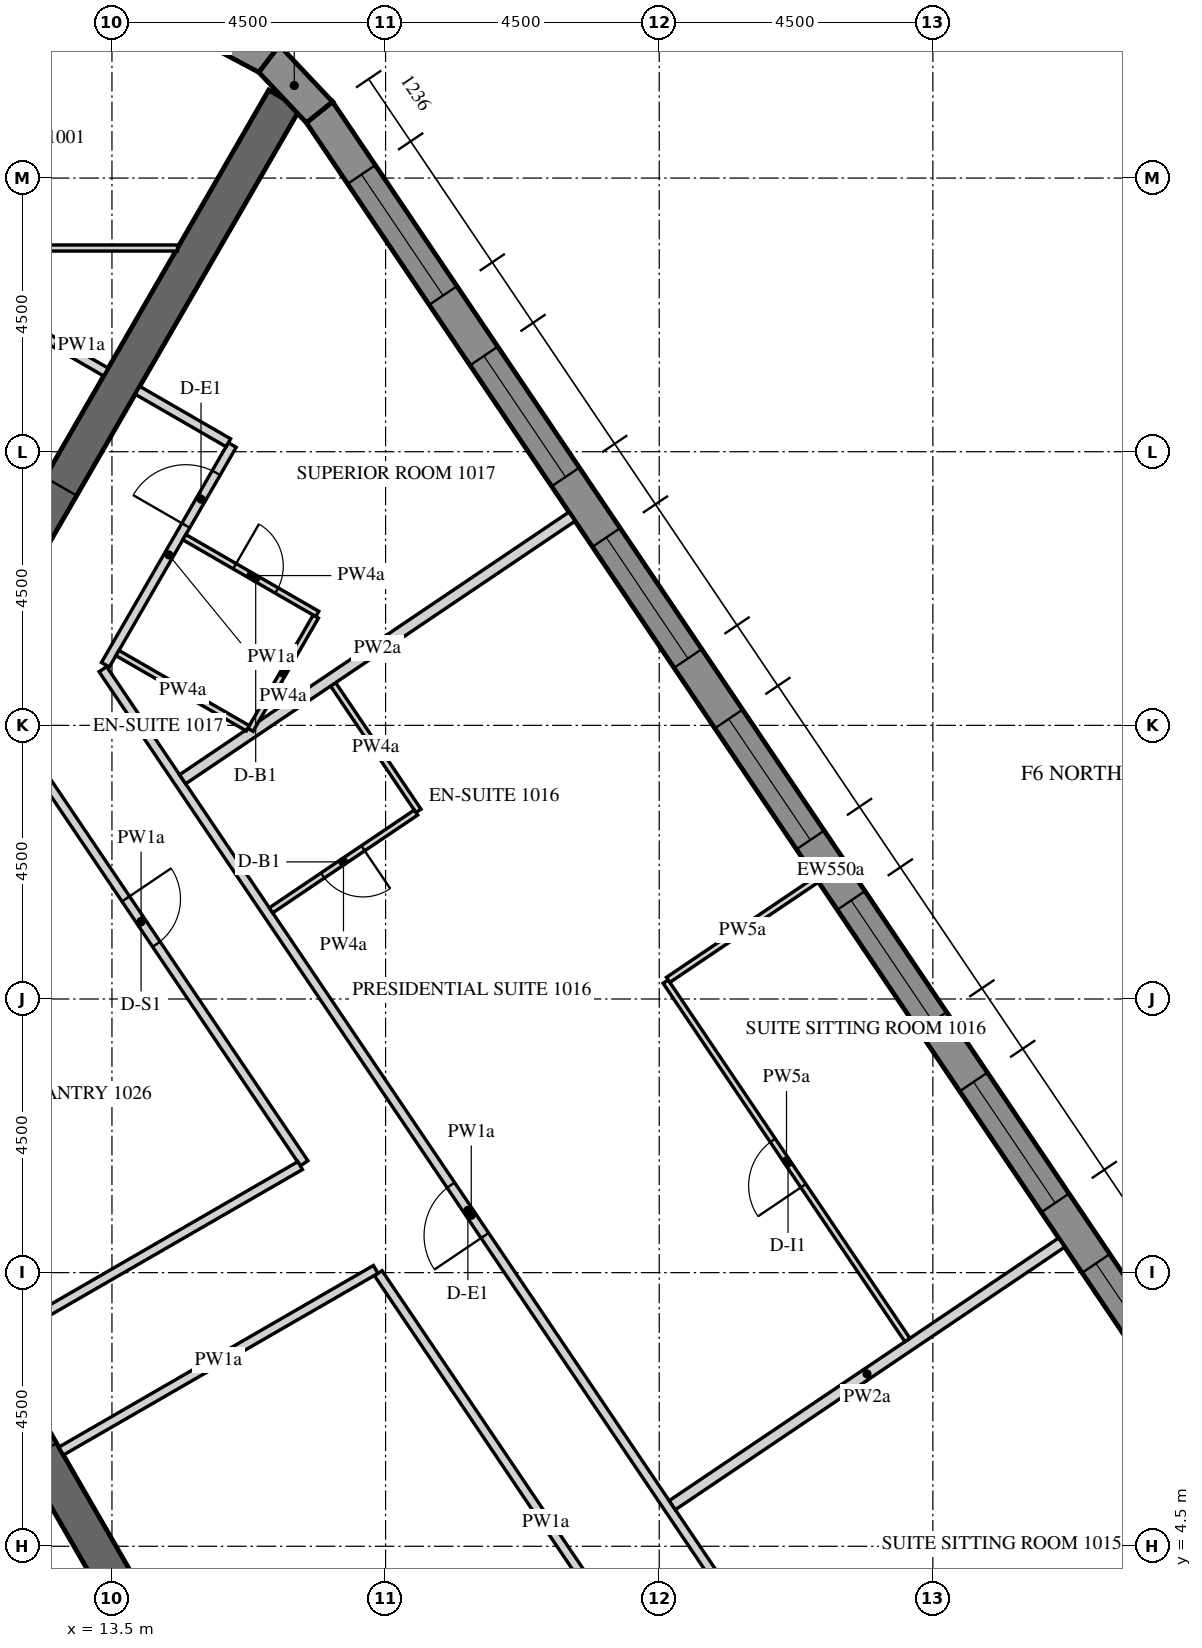
"""IFC4 building model, lengths in metres.
Left out: names, types, materials, properties, quantities, classifications, styles, units other than length and angle.
Written with IfcOpenShell. Run it as: python <this file> out.ifc"""

import sys

from ifc_helpers import new_model, si_unit, direction, frame, frame_2d, origin, place, context, subcontext, project, spatial, polyline, rectangle, outline, extrude, element, fill, save


model = new_model("IFC4")
c1 = context("Model", 3, precision=1e-05, world=origin(), true_north=direction((0.0, 1.0)))
c2 = subcontext(c1, "Body", "Model", "MODEL_VIEW")
j1 = project(units=[si_unit("LENGTHUNIT", "METRE"), si_unit("PLANEANGLEUNIT", "RADIAN")], contexts=[c1])
p1 = place(None, origin())
s1 = spatial("IfcSite", under=j1, at=p1, CompositionType="ELEMENT")
p2 = place(p1, origin())
s2 = spatial("IfcBuilding", under=s1, at=p2, CompositionType="ELEMENT")
p3 = place(p2, frame((0.0, 0.0, 142.8)))
s3 = spatial("IfcBuildingStorey", under=s2, at=p3, CompositionType="ELEMENT", Elevation=142.8)
p4 = place(p3, frame((33.728, 3.153, -0.15), z_axis=(0.0, 0.0, 1.0), x_axis=(-0.559192411416, 0.82903790445, 0.0)))
e1 = element("IfcWall", 1, at=p4, inside=s3, PredefinedType="SOLIDWALL", context=c2, shape_type="SweptSolid", body=[
    extrude(outline(polyline([(-0.026, -0.275), (30.093, -0.275), (30.048, 0.275), (0.026, 0.275), (-0.026, -0.275)])), origin(), (0.0, 0.0, 1.0), 3.75),
])
p5 = place(p4, frame((1.236, 0.0, 1.05)))
e2 = element("IfcOpeningElement", 2, at=p5, cuts=e1, PredefinedType="OPENING", context=c2, shape_type="SweptSolid", body=[
    extrude(rectangle(XDim=2.4, YDim=2.4, at=frame_2d((1.2, 1.2))), frame((0.0, 0.285, 0.0), z_axis=(0.0, -1.0, 0.0), x_axis=(1.0, 0.0, 0.0)), (0.0, 0.0, 1.0), 0.57),
])
p6 = place(p4, frame((4.835, 0.0, 1.05)))
e3 = element("IfcOpeningElement", 3, at=p6, cuts=e1, PredefinedType="OPENING", context=c2, shape_type="SweptSolid", body=[
    extrude(rectangle(XDim=2.4, YDim=2.4, at=frame_2d((1.2, 1.2))), frame((0.0, 0.285, 0.0), z_axis=(0.0, -1.0, 0.0), x_axis=(1.0, 0.0, 0.0)), (0.0, 0.0, 1.0), 0.57),
])
p7 = place(p4, frame((8.436, 0.0, 1.05)))
e4 = element("IfcOpeningElement", 4, at=p7, cuts=e1, PredefinedType="OPENING", context=c2, shape_type="SweptSolid", body=[
    extrude(rectangle(XDim=2.4, YDim=2.4, at=frame_2d((1.2, 1.2))), frame((0.0, 0.285, 0.0), z_axis=(0.0, -1.0, 0.0), x_axis=(1.0, 0.0, 0.0)), (0.0, 0.0, 1.0), 0.57),
])
p8 = place(p4, frame((12.035, 0.0, 1.05)))
e5 = element("IfcOpeningElement", 5, at=p8, cuts=e1, PredefinedType="OPENING", context=c2, shape_type="SweptSolid", body=[
    extrude(rectangle(XDim=2.4, YDim=2.4, at=frame_2d((1.2, 1.2))), frame((0.0, 0.285, 0.0), z_axis=(0.0, -1.0, 0.0), x_axis=(1.0, 0.0, 0.0)), (0.0, 0.0, 1.0), 0.57),
])
p9 = place(p4, frame((15.635, 0.0, 1.05)))
e6 = element("IfcOpeningElement", 6, at=p9, cuts=e1, PredefinedType="OPENING", context=c2, shape_type="SweptSolid", body=[
    extrude(rectangle(XDim=2.4, YDim=2.4, at=frame_2d((1.2, 1.2))), frame((0.0, 0.285, 0.0), z_axis=(0.0, -1.0, 0.0), x_axis=(1.0, 0.0, 0.0)), (0.0, 0.0, 1.0), 0.57),
])
p10 = place(p4, frame((19.236, 0.0, 1.05)))
e7 = element("IfcOpeningElement", 7, at=p10, cuts=e1, PredefinedType="OPENING", context=c2, shape_type="SweptSolid", body=[
    extrude(rectangle(XDim=2.4, YDim=2.4, at=frame_2d((1.2, 1.2))), frame((0.0, 0.285, 0.0), z_axis=(0.0, -1.0, 0.0), x_axis=(1.0, 0.0, 0.0)), (0.0, 0.0, 1.0), 0.57),
])
p11 = place(p4, frame((22.835, 0.0, 1.05)))
e8 = element("IfcOpeningElement", 8, at=p11, cuts=e1, PredefinedType="OPENING", context=c2, shape_type="SweptSolid", body=[
    extrude(rectangle(XDim=2.4, YDim=2.4, at=frame_2d((1.2, 1.2))), frame((0.0, 0.285, 0.0), z_axis=(0.0, -1.0, 0.0), x_axis=(1.0, 0.0, 0.0)), (0.0, 0.0, 1.0), 0.57),
])
p12 = place(p4, frame((26.436, 0.0, 1.05)))
e9 = element("IfcOpeningElement", 9, at=p12, cuts=e1, PredefinedType="OPENING", context=c2, shape_type="SweptSolid", body=[
    extrude(rectangle(XDim=2.4, YDim=2.4, at=frame_2d((1.2, 1.2))), frame((0.0, 0.285, 0.0), z_axis=(0.0, -1.0, 0.0), x_axis=(1.0, 0.0, 0.0)), (0.0, 0.0, 1.0), 0.57),
])
p13 = place(p3, frame((16.913, 28.083, -0.15), z_axis=(0.0, 0.0, 1.0), x_axis=(-0.686196220404, 0.727416488061, 0.0)))
e10 = element("IfcWall", 10, at=p13, inside=s3, PredefinedType="SOLIDWALL", context=c2, shape_type="SweptSolid", body=[
    extrude(outline(polyline([(-0.022, -0.275), (1.253, -0.275), (1.163, 0.275), (0.022, 0.275), (-0.022, -0.275)])), origin(), (0.0, 0.0, 1.0), 3.75),
])
p14 = place(p3, frame((16.083, 28.962, -0.15), z_axis=(0.0, 0.0, 1.0), x_axis=(-0.882995347911, 0.469381737574, 0.0)))
e11 = element("IfcWall", 11, at=p14, inside=s3, PredefinedType="SOLIDWALL", context=c2, shape_type="SweptSolid", body=[
    extrude(outline(polyline([(-0.045, -0.275), (1.253, -0.275), (1.163, 0.275), (0.045, 0.275), (-0.045, -0.275)])), origin(), (0.0, 0.0, 1.0), 3.75),
])
p15 = place(p3, frame((15.819, 0.0, -0.15), z_axis=(0.0, 0.0, 1.0), x_axis=(-0.499999880136, 0.866025472988, 0.0)))
e12 = element("IfcWall", 12, at=p15, inside=s3, PredefinedType="SHEAR", context=c2, shape_type="SweptSolid", body=[
    extrude(outline(polyline([(-0.173, -0.3), (15.993, -0.3), (15.646, 0.3), (0.173, 0.3), (-0.173, -0.3)])), origin(), (0.0, 0.0, 1.0), 3.75),
])
p16 = place(p15, frame((6.981, 0.0, 0.15)))
e13 = element("IfcOpeningElement", 13, at=p16, cuts=e12, PredefinedType="OPENING", context=c2, shape_type="SweptSolid", body=[
    extrude(rectangle(XDim=1.8, YDim=2.4, at=frame_2d((0.9, 1.2))), frame((0.0, 0.31, 0.0), z_axis=(0.0, -1.0, 0.0), x_axis=(1.0, 0.0, 0.0)), (0.0, 0.0, 1.0), 0.62),
])
p17 = place(p3, frame((8.083, 14.0, -0.15), z_axis=(0.0, 0.0, 1.0), x_axis=(0.499997680643, 0.866026742862, 0.0)))
e14 = element("IfcWall", 14, at=p17, inside=s3, PredefinedType="SHEAR", context=c2, shape_type="SweptSolid", body=[
    extrude(rectangle(XDim=16.509, YDim=0.6, at=frame_2d((8.254, 0.0))), origin(), (0.0, 0.0, 1.0), 3.75),
])
p18 = place(p17, frame((7.354, 0.0, 0.15)))
e15 = element("IfcOpeningElement", 15, at=p18, cuts=e14, PredefinedType="OPENING", context=c2, shape_type="SweptSolid", body=[
    extrude(rectangle(XDim=1.8, YDim=2.4, at=frame_2d((0.9, 1.2))), frame((0.0, 0.31, 0.0), z_axis=(0.0, -1.0, 0.0), x_axis=(1.0, 0.0, 0.0)), (0.0, 0.0, 1.0), 0.62),
])
p19 = place(p3, frame((13.4, 23.81, 0.0), z_axis=(0.0, 0.0, 1.0), x_axis=(-0.865989075817, 0.500062916607, 0.0)))
e16 = element("IfcWall", 16, at=p19, inside=s3, PredefinedType="PARTITIONING", context=c2, shape_type="SweptSolid", body=[
    extrude(rectangle(XDim=1.8, YDim=0.15, at=frame_2d((0.9, 0.0))), origin(), (0.0, 0.0, 1.0), 2.838),
])
p20 = place(p3, frame((25.467, 0.96, 0.0), z_axis=(0.0, 0.0, 1.0), x_axis=(-0.559200743185, 0.829032284547, 0.0)))
e17 = element("IfcWall", 17, at=p20, inside=s3, PredefinedType="PARTITIONING", context=c2, shape_type="SweptSolid", body=[
    extrude(rectangle(XDim=21.668, YDim=0.15, at=frame_2d((10.834, 0.0))), origin(), (0.0, 0.0, 1.0), 2.838),
])
p21 = place(p20, frame((10.434, 0.0, 0.0)))
e18 = element("IfcOpeningElement", 18, at=p21, cuts=e17, PredefinedType="OPENING", context=c2, shape_type="SweptSolid", body=[
    extrude(rectangle(XDim=1.0, YDim=2.1, at=frame_2d((0.5, 1.05))), frame((0.0, 0.085, 0.0), z_axis=(0.0, -1.0, 0.0), x_axis=(1.0, 0.0, 0.0)), (0.0, 0.0, 1.0), 0.17),
])
p22 = place(p3, frame((13.392, 18.996, 0.0), z_axis=(0.0, 0.0, 1.0), x_axis=(0.499995902753, 0.866027769318, 0.0)))
e19 = element("IfcWall", 19, at=p22, inside=s3, PredefinedType="PARTITIONING", context=c2, shape_type="SweptSolid", body=[
    extrude(rectangle(XDim=4.173, YDim=0.15, at=frame_2d((2.087, 0.0))), origin(), (0.0, 0.0, 1.0), 2.838),
])
p23 = place(p22, frame((2.645, 0.0, 0.0)))
e20 = element("IfcOpeningElement", 20, at=p23, cuts=e19, PredefinedType="OPENING", context=c2, shape_type="SweptSolid", body=[
    extrude(rectangle(XDim=1.0, YDim=2.1, at=frame_2d((0.5, 1.05))), frame((0.0, 0.085, 0.0), z_axis=(0.0, -1.0, 0.0), x_axis=(1.0, 0.0, 0.0)), (0.0, 0.0, 1.0), 0.17),
])
p24 = place(p3, frame((15.414, 22.648, 0.0), z_axis=(0.0, 0.0, 1.0), x_axis=(-0.866074815912, 0.499914405916, 0.0)))
e21 = element("IfcWall", 21, at=p24, inside=s3, PredefinedType="PARTITIONING", context=c2, shape_type="SweptSolid", body=[
    extrude(rectangle(XDim=1.725, YDim=0.15, at=frame_2d((0.862, 0.0))), origin(), (0.0, 0.0, 1.0), 2.838),
])
p25 = place(p3, frame((12.664, 6.066, 0.0), z_axis=(0.0, 0.0, 1.0), x_axis=(0.866018848283, 0.500011354289, 0.0)))
e22 = element("IfcWall", 22, at=p25, inside=s3, PredefinedType="PARTITIONING", context=c2, shape_type="SweptSolid", body=[
    extrude(rectangle(XDim=5.974, YDim=0.15, at=frame_2d((2.987, 0.0))), origin(), (0.0, 0.0, 1.0), 2.838),
])
p26 = place(p3, frame((17.879, 8.99, 0.0), z_axis=(0.0, 0.0, 1.0), x_axis=(0.559189565351, -0.829039824136, 0.0)))
e23 = element("IfcWall", 23, at=p26, inside=s3, PredefinedType="PARTITIONING", context=c2, shape_type="SweptSolid", body=[
    extrude(rectangle(XDim=9.859, YDim=0.15, at=frame_2d((4.929, 0.0))), origin(), (0.0, 0.0, 1.0), 2.838),
])
p27 = place(p3, frame((11.298, 18.748, 0.0), z_axis=(0.0, 0.0, 1.0), x_axis=(0.559198234291, -0.829033976847, 0.0)))
e24 = element("IfcWall", 24, at=p27, inside=s3, PredefinedType="PARTITIONING", context=c2, shape_type="SweptSolid", body=[
    extrude(rectangle(XDim=9.59, YDim=0.15, at=frame_2d((4.795, 0.0))), origin(), (0.0, 0.0, 1.0), 2.838),
])
p28 = place(p27, frame((4.345, 0.0, 0.0)))
e25 = element("IfcOpeningElement", 25, at=p28, cuts=e24, PredefinedType="OPENING", context=c2, shape_type="SweptSolid", body=[
    extrude(rectangle(XDim=0.9, YDim=2.1, at=frame_2d((0.45, 1.05))), frame((0.0, 0.085, 0.0), z_axis=(0.0, -1.0, 0.0), x_axis=(1.0, 0.0, 0.0)), (0.0, 0.0, 1.0), 0.17),
])
p29 = place(p3, frame((16.595, 10.76, 0.0), z_axis=(0.0, 0.0, 1.0), x_axis=(-0.866019477104, -0.500010265171, 0.0)))
e26 = element("IfcWall", 26, at=p29, inside=s3, PredefinedType="PARTITIONING", context=c2, shape_type="SweptSolid", body=[
    extrude(rectangle(XDim=5.752, YDim=0.15, at=frame_2d((2.876, 0.0))), origin(), (0.0, 0.0, 1.0), 2.838),
])
p30 = place(p3, frame((14.578, 25.85, 0.0), z_axis=(0.0, 0.0, 1.0), x_axis=(-1.0, 0.0, 0.0)))
e27 = element("IfcWall", 27, at=p30, inside=s3, PredefinedType="PARTITIONING", context=c2, shape_type="SweptSolid", body=[
    extrude(rectangle(XDim=8.589, YDim=0.1, at=frame_2d((4.294, 0.0))), origin(), (0.0, 0.0, 1.0), 2.838),
])
p31 = place(p30, frame((4.539, 0.0, 0.0)))
e28 = element("IfcOpeningElement", 28, at=p31, cuts=e27, PredefinedType="OPENING", context=c2, shape_type="SweptSolid", body=[
    extrude(rectangle(XDim=0.9, YDim=2.1, at=frame_2d((0.45, 1.05))), frame((0.0, 0.06, 0.0), z_axis=(0.0, -1.0, 0.0), x_axis=(1.0, 0.0, 0.0)), (0.0, 0.0, 1.0), 0.12),
])
p32 = place(p3, frame((29.119, 9.495, 0.0), z_axis=(0.0, 0.0, 1.0), x_axis=(-0.82903328576, -0.559199258853, 0.0)))
e29 = element("IfcWall", 29, at=p32, inside=s3, PredefinedType="PARTITIONING", context=c2, shape_type="SweptSolid", body=[
    extrude(rectangle(XDim=7.725, YDim=0.18, at=frame_2d((3.863, 0.0))), origin(), (0.0, 0.0, 1.0), 2.838),
])
p33 = place(p3, frame((17.137, 18.675, 0.0), z_axis=(0.0, 0.0, 1.0), x_axis=(0.559203861497, -0.829030181168, 0.0)))
e30 = element("IfcWall", 30, at=p33, inside=s3, PredefinedType="PARTITIONING", context=c2, shape_type="SweptSolid", body=[
    extrude(rectangle(XDim=2.51, YDim=0.1, at=frame_2d((1.255, 0.0))), origin(), (0.0, 0.0, 1.0), 2.838),
])
p34 = place(p3, frame((18.499, 16.566, 0.0), z_axis=(0.0, 0.0, 1.0), x_axis=(-0.82904649496, -0.559179675234, 0.0)))
e31 = element("IfcWall", 31, at=p34, inside=s3, PredefinedType="PARTITIONING", context=c2, shape_type="SweptSolid", body=[
    extrude(rectangle(XDim=2.875, YDim=0.1, at=frame_2d((1.438, 0.0))), origin(), (0.0, 0.0, 1.0), 2.838),
])
p35 = place(p34, frame((1.05, 0.0, 0.0)))
e32 = element("IfcOpeningElement", 32, at=p35, cuts=e31, PredefinedType="OPENING", context=c2, shape_type="SweptSolid", body=[
    extrude(rectangle(XDim=0.8, YDim=2.1, at=frame_2d((0.4, 1.05))), frame((0.0, 0.06, 0.0), z_axis=(0.0, -1.0, 0.0), x_axis=(1.0, 0.0, 0.0)), (0.0, 0.0, 1.0), 0.12),
])
p36 = place(p3, frame((26.581, 7.892, 0.0), z_axis=(0.0, 0.0, 1.0), x_axis=(-0.559185029686, 0.829042883435, 0.0)))
e33 = element("IfcWall", 33, at=p36, inside=s3, PredefinedType="PARTITIONING", context=c2, shape_type="SweptSolid", body=[
    extrude(rectangle(XDim=7.11, YDim=0.1, at=frame_2d((3.555, 0.0))), origin(), (0.0, 0.0, 1.0), 2.838),
])
p37 = place(p36, frame((3.06, 0.0, 0.0)))
e34 = element("IfcOpeningElement", 34, at=p37, cuts=e33, PredefinedType="OPENING", context=c2, shape_type="SweptSolid", body=[
    extrude(rectangle(XDim=0.9, YDim=2.1, at=frame_2d((0.45, 1.05))), frame((0.0, 0.06, 0.0), z_axis=(0.0, -1.0, 0.0), x_axis=(1.0, 0.0, 0.0)), (0.0, 0.0, 1.0), 0.12),
])
p38 = place(p3, frame((22.647, 13.814, 0.0), z_axis=(0.0, 0.0, 1.0), x_axis=(0.829020376361, 0.559218397032, 0.0)))
e35 = element("IfcWall", 35, at=p38, inside=s3, PredefinedType="PARTITIONING", context=c2, shape_type="SweptSolid", body=[
    extrude(rectangle(XDim=2.95, YDim=0.1, at=frame_2d((1.475, 0.0))), origin(), (0.0, 0.0, 1.0), 2.838),
])
p39 = place(p3, frame((21.066, 21.433, 0.0), z_axis=(0.0, 0.0, 1.0), x_axis=(-0.82903328576, -0.559199258853, 0.0)))
e36 = element("IfcWall", 36, at=p39, inside=s3, PredefinedType="PARTITIONING", context=c2, shape_type="SweptSolid", body=[
    extrude(rectangle(XDim=7.725, YDim=0.18, at=frame_2d((3.863, 0.0))), origin(), (0.0, 0.0, 1.0), 2.838),
])
p40 = place(p3, frame((14.69, 21.094, 0.0), z_axis=(0.0, 0.0, 1.0), x_axis=(0.866039067339, -0.499976333282, 0.0)))
e37 = element("IfcWall", 37, at=p40, inside=s3, PredefinedType="PARTITIONING", context=c2, shape_type="SweptSolid", body=[
    extrude(rectangle(XDim=2.525, YDim=0.1, at=frame_2d((1.262, 0.0))), origin(), (0.0, 0.0, 1.0), 2.838),
])
p41 = place(p40, frame((0.955, 0.0, 0.0)))
e38 = element("IfcOpeningElement", 38, at=p41, cuts=e37, PredefinedType="OPENING", context=c2, shape_type="SweptSolid", body=[
    extrude(rectangle(XDim=0.8, YDim=2.1, at=frame_2d((0.4, 1.05))), frame((0.0, 0.06, 0.0), z_axis=(0.0, -1.0, 0.0), x_axis=(1.0, 0.0, 0.0)), (0.0, 0.0, 1.0), 0.12),
])
p42 = place(p3, frame((16.852, 19.789, 0.0), z_axis=(0.0, 0.0, 1.0), x_axis=(-0.499961633463, -0.866047553582, 0.0)))
e39 = element("IfcWall", 39, at=p42, inside=s3, PredefinedType="PARTITIONING", context=c2, shape_type="SweptSolid", body=[
    extrude(rectangle(XDim=2.15, YDim=0.1, at=frame_2d((1.075, 0.0))), origin(), (0.0, 0.0, 1.0), 2.838),
])
p43 = place(p3, frame((15.734, 17.952, 0.0), z_axis=(0.0, 0.0, 1.0), x_axis=(-0.866031185235, 0.4999899861, 0.0)))
e40 = element("IfcWall", 40, at=p43, inside=s3, PredefinedType="PARTITIONING", context=c2, shape_type="SweptSolid", body=[
    extrude(rectangle(XDim=2.475, YDim=0.1, at=frame_2d((1.238, 0.0))), origin(), (0.0, 0.0, 1.0), 2.838),
])
p44 = place(p6, frame((0.0, 0.205, 0.0)))
e41 = element("IfcWindow", 41, at=p44, inside=s3, PartitioningType="DOUBLE_PANEL_VERTICAL", PredefinedType="WINDOW", context=c2, shape_type="SweptSolid", body=[
    extrude(rectangle(XDim=2.4, YDim=2.4, at=frame_2d((1.2, 1.2))), frame((0.0, 0.03, 0.0), z_axis=(0.0, -1.0, 0.0), x_axis=(1.0, 0.0, 0.0)), (0.0, 0.0, 1.0), 0.06),
])
fill(e3, e41)
p45 = place(p7, frame((0.0, 0.205, 0.0)))
e42 = element("IfcWindow", 42, at=p45, inside=s3, PartitioningType="DOUBLE_PANEL_VERTICAL", PredefinedType="WINDOW", context=c2, shape_type="SweptSolid", body=[
    extrude(rectangle(XDim=2.4, YDim=2.4, at=frame_2d((1.2, 1.2))), frame((0.0, 0.03, 0.0), z_axis=(0.0, -1.0, 0.0), x_axis=(1.0, 0.0, 0.0)), (0.0, 0.0, 1.0), 0.06),
])
fill(e4, e42)
p46 = place(p8, frame((0.0, 0.205, 0.0)))
e43 = element("IfcWindow", 43, at=p46, inside=s3, PartitioningType="DOUBLE_PANEL_VERTICAL", PredefinedType="WINDOW", context=c2, shape_type="SweptSolid", body=[
    extrude(rectangle(XDim=2.4, YDim=2.4, at=frame_2d((1.2, 1.2))), frame((0.0, 0.03, 0.0), z_axis=(0.0, -1.0, 0.0), x_axis=(1.0, 0.0, 0.0)), (0.0, 0.0, 1.0), 0.06),
])
fill(e5, e43)
p47 = place(p9, frame((0.0, 0.205, 0.0)))
e44 = element("IfcWindow", 44, at=p47, inside=s3, PartitioningType="DOUBLE_PANEL_VERTICAL", PredefinedType="WINDOW", context=c2, shape_type="SweptSolid", body=[
    extrude(rectangle(XDim=2.4, YDim=2.4, at=frame_2d((1.2, 1.2))), frame((0.0, 0.03, 0.0), z_axis=(0.0, -1.0, 0.0), x_axis=(1.0, 0.0, 0.0)), (0.0, 0.0, 1.0), 0.06),
])
fill(e6, e44)
p48 = place(p10, frame((0.0, 0.205, 0.0)))
e45 = element("IfcWindow", 45, at=p48, inside=s3, PartitioningType="DOUBLE_PANEL_VERTICAL", PredefinedType="WINDOW", context=c2, shape_type="SweptSolid", body=[
    extrude(rectangle(XDim=2.4, YDim=2.4, at=frame_2d((1.2, 1.2))), frame((0.0, 0.03, 0.0), z_axis=(0.0, -1.0, 0.0), x_axis=(1.0, 0.0, 0.0)), (0.0, 0.0, 1.0), 0.06),
])
fill(e7, e45)
p49 = place(p11, frame((0.0, 0.205, 0.0)))
e46 = element("IfcWindow", 46, at=p49, inside=s3, PartitioningType="DOUBLE_PANEL_VERTICAL", PredefinedType="WINDOW", context=c2, shape_type="SweptSolid", body=[
    extrude(rectangle(XDim=2.4, YDim=2.4, at=frame_2d((1.2, 1.2))), frame((0.0, 0.03, 0.0), z_axis=(0.0, -1.0, 0.0), x_axis=(1.0, 0.0, 0.0)), (0.0, 0.0, 1.0), 0.06),
])
fill(e8, e46)
p50 = place(p12, frame((0.0, 0.205, 0.0)))
e47 = element("IfcWindow", 47, at=p50, inside=s3, PartitioningType="DOUBLE_PANEL_VERTICAL", PredefinedType="WINDOW", context=c2, shape_type="SweptSolid", body=[
    extrude(rectangle(XDim=2.4, YDim=2.4, at=frame_2d((1.2, 1.2))), frame((0.0, 0.03, 0.0), z_axis=(0.0, -1.0, 0.0), x_axis=(1.0, 0.0, 0.0)), (0.0, 0.0, 1.0), 0.06),
])
fill(e9, e47)
p51 = place(p18, origin())
e48 = element("IfcDoor", 48, at=p51, inside=s3, OperationType="DOUBLE_DOOR_SINGLE_SWING", PredefinedType="DOOR", context=c2, shape_type="SweptSolid", body=[
    extrude(rectangle(XDim=1.8, YDim=2.4, at=frame_2d((0.9, 1.2))), frame((0.0, 0.025, 0.0), z_axis=(0.0, -1.0, 0.0), x_axis=(1.0, 0.0, 0.0)), (0.0, 0.0, 1.0), 0.05),
])
fill(e15, e48)
p52 = place(p21, origin())
e49 = element("IfcDoor", 49, at=p52, inside=s3, OperationType="SINGLE_SWING_RIGHT", PredefinedType="DOOR", context=c2, shape_type="SweptSolid", body=[
    extrude(rectangle(XDim=1.0, YDim=2.1, at=frame_2d((0.5, 1.05))), frame((0.0, 0.025, 0.0), z_axis=(0.0, -1.0, 0.0), x_axis=(1.0, 0.0, 0.0)), (0.0, 0.0, 1.0), 0.05),
])
fill(e18, e49)
p53 = place(p35, origin())
e50 = element("IfcDoor", 50, at=p53, inside=s3, OperationType="SINGLE_SWING_LEFT", PredefinedType="DOOR", context=c2, shape_type="SweptSolid", body=[
    extrude(rectangle(XDim=0.8, YDim=2.1, at=frame_2d((0.4, 1.05))), frame((0.0, 0.025, 0.0), z_axis=(0.0, -1.0, 0.0), x_axis=(1.0, 0.0, 0.0)), (0.0, 0.0, 1.0), 0.05),
])
fill(e32, e50)
p54 = place(p37, origin())
e51 = element("IfcDoor", 51, at=p54, inside=s3, OperationType="SINGLE_SWING_RIGHT", PredefinedType="DOOR", context=c2, shape_type="SweptSolid", body=[
    extrude(rectangle(XDim=0.9, YDim=2.1, at=frame_2d((0.45, 1.05))), frame((0.0, 0.025, 0.0), z_axis=(0.0, -1.0, 0.0), x_axis=(1.0, 0.0, 0.0)), (0.0, 0.0, 1.0), 0.05),
])
fill(e34, e51)
p55 = place(p23, origin())
e52 = element("IfcDoor", 52, at=p55, inside=s3, OperationType="SINGLE_SWING_LEFT", PredefinedType="DOOR", context=c2, shape_type="SweptSolid", body=[
    extrude(rectangle(XDim=1.0, YDim=2.1, at=frame_2d((0.5, 1.05))), frame((0.0, 0.025, 0.0), z_axis=(0.0, -1.0, 0.0), x_axis=(1.0, 0.0, 0.0)), (0.0, 0.0, 1.0), 0.05),
])
fill(e20, e52)
p56 = place(p41, origin())
e53 = element("IfcDoor", 53, at=p56, inside=s3, OperationType="SINGLE_SWING_LEFT", PredefinedType="DOOR", context=c2, shape_type="SweptSolid", body=[
    extrude(rectangle(XDim=0.8, YDim=2.1, at=frame_2d((0.4, 1.05))), frame((0.0, 0.025, 0.0), z_axis=(0.0, -1.0, 0.0), x_axis=(1.0, 0.0, 0.0)), (0.0, 0.0, 1.0), 0.05),
])
fill(e38, e53)
p57 = place(p28, origin())
e54 = element("IfcDoor", 54, at=p57, inside=s3, OperationType="SINGLE_SWING_RIGHT", PredefinedType="DOOR", context=c2, shape_type="SweptSolid", body=[
    extrude(rectangle(XDim=0.9, YDim=2.1, at=frame_2d((0.45, 1.05))), frame((0.0, 0.025, 0.0), z_axis=(0.0, -1.0, 0.0), x_axis=(1.0, 0.0, 0.0)), (0.0, 0.0, 1.0), 0.05),
])
fill(e25, e54)
save(model, sys.argv[1])
